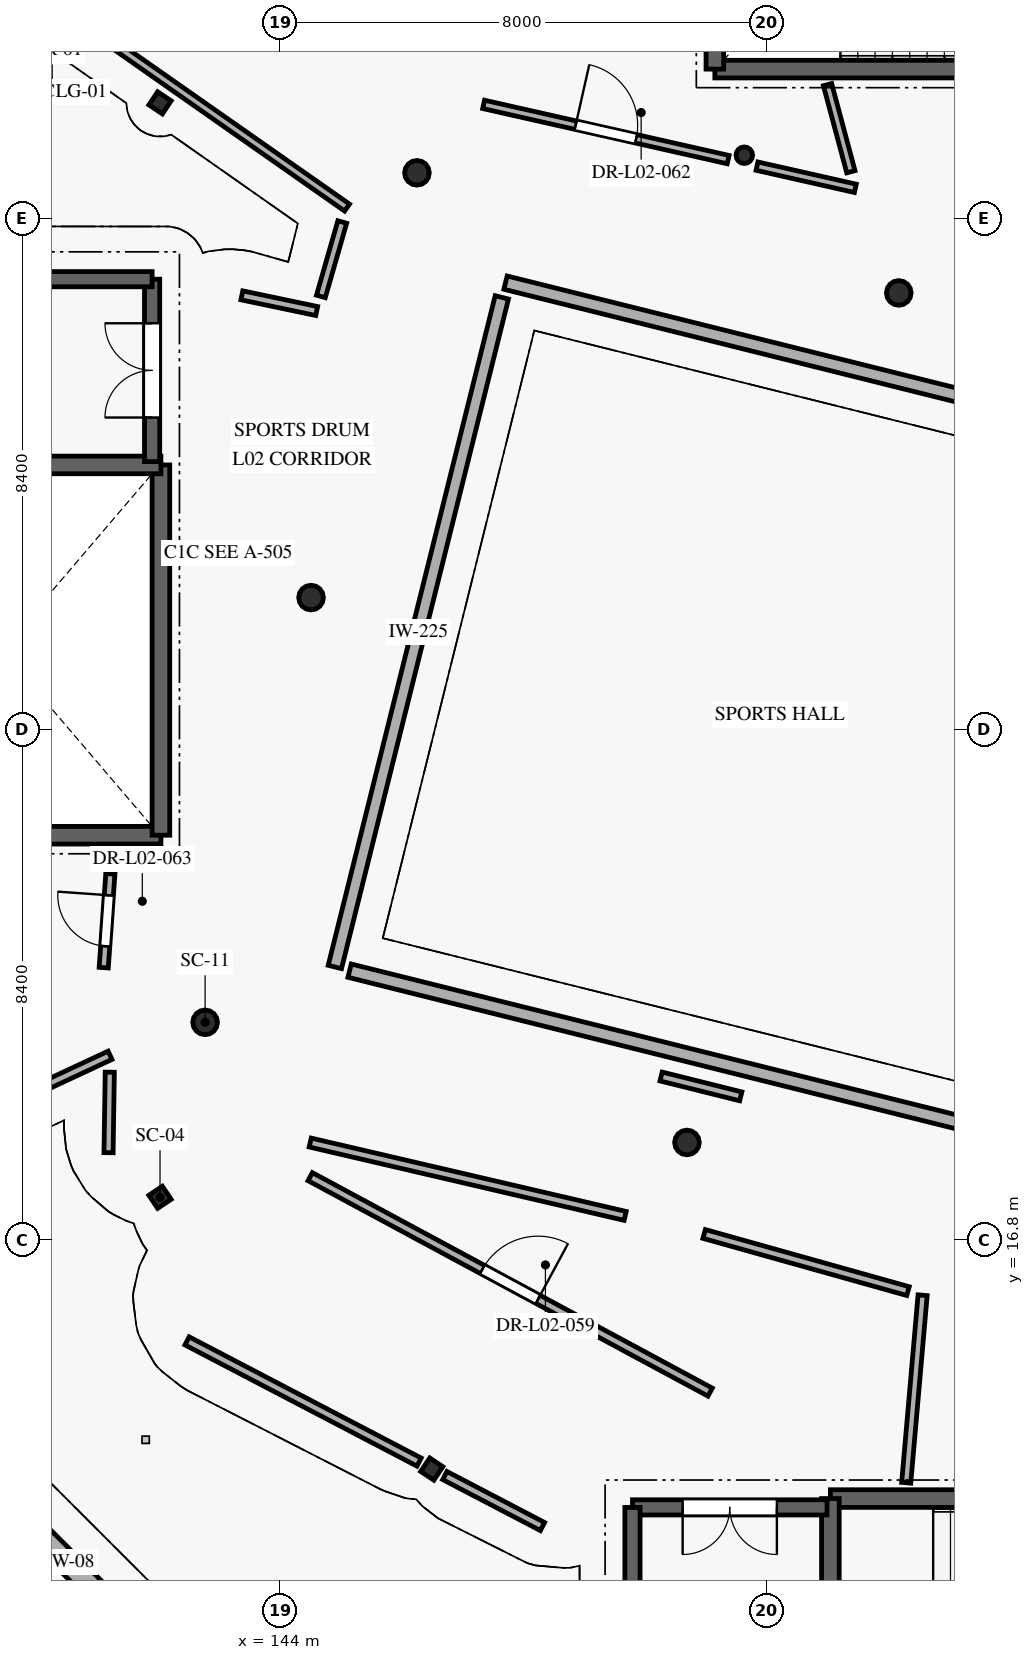
"""IFC4 building model, lengths in metres.
Left out: names, types, materials, properties, quantities, classifications, styles, units other than length and angle.
Written with IfcOpenShell. Run it as: python <this file> out.ifc"""

import sys

from ifc_helpers import new_model, si_unit, direction, frame, frame_2d, origin, origin_2d, place, context, subcontext, project, spatial, rectangle, hollow_circle, i_section, extrude, element, fill, save


model = new_model("IFC4")
c1 = context("Model", 3, precision=1e-05, world=origin(), true_north=direction((0.0, 1.0)))
c2 = subcontext(c1, "Body", "Model", "MODEL_VIEW")
j1 = project(units=[si_unit("LENGTHUNIT", "METRE"), si_unit("PLANEANGLEUNIT", "RADIAN")], contexts=[c1])
p1 = place(None, origin())
s1 = spatial("IfcSite", under=j1, at=p1, CompositionType="ELEMENT")
p2 = place(p1, origin())
s2 = spatial("IfcBuilding", under=s1, at=p2, CompositionType="ELEMENT")
p3 = place(p2, frame((0.0, 0.0, 8.4)))
s3 = spatial("IfcBuildingStorey", under=s2, at=p3, CompositionType="ELEMENT", Elevation=8.4)
for number, where, z_axis, x_axis in (
    (1, (142.772, 20.377, 0.0), (0.0, 0.0, 1.0), (0.97, -0.242, 0.0)),
    (2, (144.514, 27.364, 0.0), (0.0, 0.0, 1.0), (0.97, -0.242, 0.0)),
    (3, (146.256, 34.35, 0.0), (0.0, 0.0, 1.0), (0.97, -0.242, 0.0)),
    (4, (150.696, 18.402, 0.0), (0.0, 0.0, 1.0), (0.97, -0.242, 0.0)),
    (5, (154.18, 32.374, 0.0), (0.0, 0.0, 1.0), (0.97, -0.242, 0.0)),
):
    element("IfcColumn", number, at=place(p3, frame(where, z_axis=z_axis, x_axis=x_axis)), inside=s3, PredefinedType="COLUMN", context=c2, shape_type="SweptSolid", body=[
        extrude(hollow_circle(Radius=0.203, WallThickness=0.016, at=origin_2d()), origin(), (0.0, 0.0, 1.0), 4.2),
    ])
p4 = place(p3, frame((151.639, 34.639, 0.0), z_axis=(0.0, 0.0, 1.0), x_axis=(0.707106781187, -0.707106781187, 0.0)))
e6 = element("IfcColumn", 6, at=p4, inside=s3, PredefinedType="COLUMN", context=c2, shape_type="SweptSolid", body=[
    extrude(hollow_circle(Radius=0.136, WallThickness=0.012, at=origin_2d()), origin(), (0.0, 0.0, 1.0), 4.2),
])
for number, where, z_axis, x_axis in (
    (7, (142.03, 35.5, 0.0), (0.0, 0.0, 1.0), (-0.556, -0.831, 0.0)),
    (8, (142.03, 17.5, 0.0), (0.0, 0.0, 1.0), (0.556, -0.831, 0.0)),
    (9, (146.5, 13.03, 0.0), (0.0, 0.0, 1.0), (0.831, -0.556, 0.0)),
):
    element("IfcColumn", number, at=place(p3, frame(where, z_axis=z_axis, x_axis=x_axis)), inside=s3, PredefinedType="COLUMN", context=c2, shape_type="SweptSolid", body=[
        extrude(i_section(OverallWidth=0.259, OverallDepth=0.267, WebThickness=0.013, FlangeThickness=0.021, FilletRadius=0.013, at=origin_2d()), origin(), (0.0, 0.0, 1.0), 4.2),
    ])
p5 = place(p3, frame((143.484, 8.517, 0.0), z_axis=(0.0, 0.0, 1.0), x_axis=(-0.707106781187, 0.707106781187, 0.0)))
e10 = element("IfcWall", 10, at=p5, inside=s3, PredefinedType="SOLIDWALL", context=c2, shape_type="SweptSolid", body=[
    extrude(rectangle(XDim=8.439, YDim=0.365, at=frame_2d((4.219, 0.0))), origin(), (0.0, 0.0, 1.0), 3.94),
])
p6 = place(p5, frame((1.56, 0.0, 0.85)))
e11 = element("IfcOpeningElement", 11, at=p6, cuts=e10, PredefinedType="OPENING", context=c2, shape_type="SweptSolid", body=[
    extrude(rectangle(XDim=1.1, YDim=1.4, at=frame_2d((0.55, 0.7))), frame((0.0, 0.192, 0.0), z_axis=(0.0, -1.0, 0.0), x_axis=(1.0, 0.0, 0.0)), (0.0, 0.0, 1.0), 0.385),
])
p7 = place(p5, frame((5.704, 0.0, 0.85)))
e12 = element("IfcOpeningElement", 12, at=p7, cuts=e10, PredefinedType="OPENING", context=c2, shape_type="SweptSolid", body=[
    extrude(rectangle(XDim=1.25, YDim=1.4, at=frame_2d((0.625, 0.7))), frame((0.0, 0.192, 0.0), z_axis=(0.0, -1.0, 0.0), x_axis=(1.0, 0.0, 0.0)), (0.0, 0.0, 1.0), 0.385),
])
p8 = place(p3, frame((136.767, 13.586, 0.0), z_axis=(0.0, 0.0, 1.0), x_axis=(0.707106781187, -0.707106781187, 0.0)))
e13 = element("IfcWall", 13, at=p8, inside=s3, PredefinedType="ELEMENTEDWALL", context=c2, shape_type="SweptSolid", body=[
    extrude(rectangle(XDim=8.23, YDim=0.225, at=frame_2d((4.115, 0.0))), origin(), (0.0, 0.0, 1.0), 1.09),
])
p9 = place(p3, frame((151.155, 36.055, 0.0), z_axis=(0.0, 0.0, 1.0), x_axis=(1.0, 0.0, 0.0)))
e14 = element("IfcWall", 14, at=p9, inside=s3, PredefinedType="SHEAR", context=c2, shape_type="SweptSolid", body=[
    extrude(rectangle(XDim=6.89, YDim=0.29, at=frame_2d((3.445, 0.0))), origin(), (0.0, 0.0, 1.0), 3.95),
])
p10 = place(p3, frame((151.155, 42.345, 0.0), z_axis=(0.0, 0.0, 1.0), x_axis=(0.0, -1.0, 0.0)))
e15 = element("IfcWall", 15, at=p10, inside=s3, PredefinedType="SHEAR", context=c2, shape_type="SweptSolid", body=[
    extrude(rectangle(XDim=6.29, YDim=0.29, at=frame_2d((3.145, 0.0))), origin(), (0.0, 0.0, 1.0), 3.95),
])
p11 = place(p3, frame((159.945, 12.545, 0.0), z_axis=(0.0, 0.0, 1.0), x_axis=(-1.0, 0.0, 0.0)))
e16 = element("IfcWall", 16, at=p11, inside=s3, PredefinedType="SHEAR", context=c2, shape_type="SweptSolid", body=[
    extrude(rectangle(XDim=6.89, YDim=0.29, at=frame_2d((3.445, 0.0))), origin(), (0.0, 0.0, 1.0), 3.95),
])
p12 = place(p3, frame((153.055, 12.545, 0.0), z_axis=(0.0, 0.0, 1.0), x_axis=(0.0, -1.0, 0.0)))
e17 = element("IfcWall", 17, at=p12, inside=s3, PredefinedType="SHEAR", context=c2, shape_type="SweptSolid", body=[
    extrude(rectangle(XDim=6.29, YDim=0.29, at=frame_2d((3.145, 0.0))), origin(), (0.0, 0.0, 1.0), 3.95),
])
p13 = place(p12, frame((2.52, 0.0, 0.0)))
e18 = element("IfcOpeningElement", 18, at=p13, cuts=e17, PredefinedType="OPENING", context=c2, shape_type="SweptSolid", body=[
    extrude(rectangle(XDim=1.25, YDim=2.1, at=frame_2d((0.625, 1.05))), frame((0.0, 0.155, 0.0), z_axis=(0.0, -1.0, 0.0), x_axis=(1.0, 0.0, 0.0)), (0.0, 0.0, 1.0), 0.31),
])
p14 = place(p3, frame((153.0, 12.4, 0.0), z_axis=(0.0, 0.0, 1.0), x_axis=(-1.0, 0.0, 0.0)))
e19 = element("IfcWall", 19, at=p14, inside=s3, PredefinedType="SHEAR", context=c2, shape_type="SweptSolid", body=[
    extrude(rectangle(XDim=3.2, YDim=0.25, at=frame_2d((1.6, 0.0))), origin(), (0.0, 0.0, 1.0), 3.95),
])
p15 = place(p14, frame((0.825, 0.0, 0.0)))
e20 = element("IfcOpeningElement", 20, at=p15, cuts=e19, PredefinedType="OPENING", context=c2, shape_type="SweptSolid", body=[
    extrude(rectangle(XDim=1.55, YDim=2.15, at=frame_2d((0.775, 1.075))), frame((0.0, 0.135, 0.0), z_axis=(0.0, -1.0, 0.0), x_axis=(1.0, 0.0, 0.0)), (0.0, 0.0, 1.0), 0.27),
])
p16 = place(p3, frame((149.8, 12.4, 0.0), z_axis=(0.0, 0.0, 1.0), x_axis=(0.0, -1.0, 0.0)))
e21 = element("IfcWall", 21, at=p16, inside=s3, PredefinedType="SHEAR", context=c2, shape_type="SweptSolid", body=[
    extrude(rectangle(XDim=6.0, YDim=0.25, at=frame_2d((3.0, 0.0))), origin(), (0.0, 0.0, 1.0), 3.95),
])
p17 = place(p3, frame((135.255, 23.455, 0.0), z_axis=(0.0, 0.0, 1.0), x_axis=(1.0, 0.0, 0.0)))
e22 = element("IfcWall", 22, at=p17, inside=s3, PredefinedType="SHEAR", context=c2, shape_type="SweptSolid", body=[
    extrude(rectangle(XDim=6.79, YDim=0.29, at=frame_2d((3.395, 0.0))), origin(), (0.0, 0.0, 1.0), 3.95),
])
p18 = place(p3, frame((142.045, 23.455, 0.0), z_axis=(0.0, 0.0, 1.0), x_axis=(0.0, 1.0, 0.0)))
e23 = element("IfcWall", 23, at=p18, inside=s3, PredefinedType="SHEAR", context=c2, shape_type="SweptSolid", body=[
    extrude(rectangle(XDim=6.09, YDim=0.29, at=frame_2d((3.045, 0.0))), origin(), (0.0, 0.0, 1.0), 3.95),
])
p19 = place(p3, frame((142.045, 29.545, 0.0), z_axis=(0.0, 0.0, 1.0), x_axis=(-1.0, 0.0, 0.0)))
e24 = element("IfcWall", 24, at=p19, inside=s3, PredefinedType="SHEAR", context=c2, shape_type="SweptSolid", body=[
    extrude(rectangle(XDim=6.79, YDim=0.29, at=frame_2d((3.395, 0.0))), origin(), (0.0, 0.0, 1.0), 3.95),
])
p20 = place(p19, frame((5.25, 0.0, 0.0)))
e25 = element("IfcOpeningElement", 25, at=p20, cuts=e24, PredefinedType="OPENING", context=c2, shape_type="SweptSolid", body=[
    extrude(rectangle(XDim=1.15, YDim=2.1, at=frame_2d((0.575, 1.05))), frame((0.0, 0.155, 0.0), z_axis=(0.0, -1.0, 0.0), x_axis=(1.0, 0.0, 0.0)), (0.0, 0.0, 1.0), 0.31),
])
p21 = place(p3, frame((141.9, 29.6, 0.0), z_axis=(0.0, 0.0, 1.0), x_axis=(0.0, 1.0, 0.0)))
e26 = element("IfcWall", 26, at=p21, inside=s3, PredefinedType="SHEAR", context=c2, shape_type="SweptSolid", body=[
    extrude(rectangle(XDim=3.0, YDim=0.25, at=frame_2d((1.5, 0.0))), origin(), (0.0, 0.0, 1.0), 3.95),
])
p22 = place(p21, frame((0.725, 0.0, 0.0)))
e27 = element("IfcOpeningElement", 27, at=p22, cuts=e26, PredefinedType="OPENING", context=c2, shape_type="SweptSolid", body=[
    extrude(rectangle(XDim=1.55, YDim=2.15, at=frame_2d((0.775, 1.075))), frame((0.0, 0.135, 0.0), z_axis=(0.0, -1.0, 0.0), x_axis=(1.0, 0.0, 0.0)), (0.0, 0.0, 1.0), 0.27),
])
p23 = place(p3, frame((141.9, 32.6, 0.0), z_axis=(0.0, 0.0, 1.0), x_axis=(-1.0, 0.0, 0.0)))
e28 = element("IfcWall", 28, at=p23, inside=s3, PredefinedType="SHEAR", context=c2, shape_type="SweptSolid", body=[
    extrude(rectangle(XDim=6.5, YDim=0.25, at=frame_2d((3.25, 0.0))), origin(), (0.0, 0.0, 1.0), 3.95),
])
p24 = place(p3, frame((167.894, 27.512, 0.0), z_axis=(0.0, 0.0, 1.0), x_axis=(-0.970295584886, 0.241922462682, 0.0)))
e29 = element("IfcWall", 29, at=p24, inside=s3, PredefinedType="PARTITIONING", context=c2, shape_type="SweptSolid", body=[
    extrude(rectangle(XDim=20.8, YDim=0.225, at=frame_2d((10.4, 0.0))), origin(), (0.0, 0.0, 1.0), 3.95),
])
p25 = place(p24, frame((9.47, 0.0, 0.0)))
e30 = element("IfcOpeningElement", 30, at=p25, cuts=e29, PredefinedType="OPENING", context=c2, shape_type="SweptSolid", body=[
    extrude(rectangle(XDim=1.86, YDim=2.2, at=frame_2d((0.93, 1.1))), frame((0.0, 0.123, 0.0), z_axis=(0.0, -1.0, 0.0), x_axis=(1.0, 0.0, 0.0)), (0.0, 0.0, 1.0), 0.245),
])
p26 = place(p3, frame((147.652, 32.301, 0.0), z_axis=(0.0, 0.0, 1.0), x_axis=(-0.241928223143, -0.97029414862, 0.0)))
e31 = element("IfcWall", 31, at=p26, inside=s3, PredefinedType="PARTITIONING", context=c2, shape_type="SweptSolid", body=[
    extrude(rectangle(XDim=11.35, YDim=0.225, at=frame_2d((5.675, 0.0))), origin(), (0.0, 0.0, 1.0), 3.95),
])
p27 = place(p3, frame((145.148, 21.228, 0.0), z_axis=(0.0, 0.0, 1.0), x_axis=(0.970296746874, -0.241917802169, 0.0)))
e32 = element("IfcWall", 32, at=p27, inside=s3, PredefinedType="PARTITIONING", context=c2, shape_type="SweptSolid", body=[
    extrude(rectangle(XDim=20.55, YDim=0.225, at=frame_2d((10.275, 0.0))), origin(), (0.0, 0.0, 1.0), 3.95),
])
p28 = place(p3, frame((141.208, 19.836, 0.0), z_axis=(0.0, 0.0, 1.0), x_axis=(-0.906301055213, -0.422632697882, 0.0)))
e33 = element("IfcWall", 33, at=p28, inside=s3, PredefinedType="PARTITIONING", context=c2, shape_type="SweptSolid", body=[
    extrude(rectangle(XDim=5.288, YDim=0.15, at=frame_2d((2.644, 0.0))), origin(), (0.0, 0.0, 1.0), 3.915),
])
p29 = place(p3, frame((154.302, 12.805, 0.0), z_axis=(0.0, 0.0, 1.0), x_axis=(0.08712978082, 0.996196969125, 0.0)))
e34 = element("IfcWall", 34, at=p29, inside=s3, PredefinedType="PARTITIONING", context=c2, shape_type="SweptSolid", body=[
    extrude(rectangle(XDim=3.096, YDim=0.15, at=frame_2d((1.548, 0.0))), origin(), (0.0, 0.0, 1.0), 3.915),
])
p30 = place(p3, frame((154.331, 15.957, 0.0), z_axis=(0.0, 0.0, 1.0), x_axis=(-0.96284886492, 0.270040854913, 0.0)))
e35 = element("IfcWall", 35, at=p30, inside=s3, PredefinedType="PARTITIONING", context=c2, shape_type="SweptSolid", body=[
    extrude(rectangle(XDim=3.482, YDim=0.15, at=frame_2d((1.741, 0.0))), origin(), (0.0, 0.0, 1.0), 3.915),
])
p31 = place(p3, frame((151.581, 19.16, 0.0), z_axis=(0.0, 0.0, 1.0), x_axis=(-0.970301811202, 0.241897488986, 0.0)))
e36 = element("IfcWall", 36, at=p31, inside=s3, PredefinedType="PARTITIONING", context=c2, shape_type="SweptSolid", body=[
    extrude(rectangle(XDim=1.35, YDim=0.15, at=frame_2d((0.675, 0.0))), origin(), (0.0, 0.0, 1.0), 3.915),
])
p32 = place(p3, frame((149.679, 17.194, 0.0), z_axis=(0.0, 0.0, 1.0), x_axis=(-0.973924106984, 0.226874048396, 0.0)))
e37 = element("IfcWall", 37, at=p32, inside=s3, PredefinedType="PARTITIONING", context=c2, shape_type="SweptSolid", body=[
    extrude(rectangle(XDim=5.318, YDim=0.15, at=frame_2d((2.659, 0.0))), origin(), (0.0, 0.0, 1.0), 3.915),
])
p33 = place(p3, frame((144.5, 17.84, 0.0), z_axis=(0.0, 0.0, 1.0), x_axis=(0.880350401945, -0.474323908101, 0.0)))
e38 = element("IfcWall", 38, at=p33, inside=s3, PredefinedType="PARTITIONING", context=c2, shape_type="SweptSolid", body=[
    extrude(rectangle(XDim=7.471, YDim=0.15, at=frame_2d((3.735, 0.0))), origin(), (0.0, 0.0, 1.0), 3.915),
])
p34 = place(p33, frame((3.216, 0.0, 0.0)))
e39 = element("IfcOpeningElement", 39, at=p34, cuts=e38, PredefinedType="OPENING", context=c2, shape_type="SweptSolid", body=[
    extrude(rectangle(XDim=1.04, YDim=2.1, at=frame_2d((0.52, 1.05))), frame((0.0, 0.085, 0.0), z_axis=(0.0, -1.0, 0.0), x_axis=(1.0, 0.0, 0.0)), (0.0, 0.0, 1.0), 0.17),
])
p35 = place(p3, frame((148.32, 12.085, 0.0), z_axis=(0.0, 0.0, 1.0), x_axis=(-0.886363704314, 0.462989615084, 0.0)))
e40 = element("IfcWall", 40, at=p35, inside=s3, PredefinedType="PARTITIONING", context=c2, shape_type="SweptSolid", body=[
    extrude(rectangle(XDim=1.812, YDim=0.15, at=frame_2d((0.906, 0.0))), origin(), (0.0, 0.0, 1.0), 3.915),
])
p36 = place(p3, frame((146.291, 13.145, 0.0), z_axis=(0.0, 0.0, 1.0), x_axis=(-0.886370383777, 0.462976827457, 0.0)))
e41 = element("IfcWall", 41, at=p36, inside=s3, PredefinedType="PARTITIONING", context=c2, shape_type="SweptSolid", body=[
    extrude(rectangle(XDim=4.305, YDim=0.15, at=frame_2d((2.153, 0.0))), origin(), (0.0, 0.0, 1.0), 3.384),
])
p37 = place(p3, frame((141.184, 18.234, 0.0), z_axis=(0.0, 0.0, 1.0), x_axis=(0.015300568579, 0.999882939449, 0.0)))
e42 = element("IfcWall", 42, at=p37, inside=s3, PredefinedType="PARTITIONING", context=c2, shape_type="SweptSolid", body=[
    extrude(rectangle(XDim=1.324, YDim=0.15, at=frame_2d((0.662, 0.0))), origin(), (0.0, 0.0, 1.0), 3.915),
])
p38 = place(p3, frame((147.352, 35.475, 0.0), z_axis=(0.0, 0.0, 1.0), x_axis=(0.975434434916, -0.220289952519, 0.0)))
e43 = element("IfcWall", 43, at=p38, inside=s3, PredefinedType="PLUMBINGWALL", context=c2, shape_type="SweptSolid", body=[
    extrude(rectangle(XDim=4.123, YDim=0.14, at=frame_2d((2.062, 0.0))), origin(), (0.0, 0.0, 1.0), 3.915),
])
p39 = place(p38, frame((1.551, 0.0, 0.0)))
e44 = element("IfcOpeningElement", 44, at=p39, cuts=e43, PredefinedType="OPENING", context=c2, shape_type="SweptSolid", body=[
    extrude(rectangle(XDim=1.02, YDim=2.06, at=frame_2d((0.51, 1.03))), frame((0.0, 0.08, 0.0), z_axis=(0.0, -1.0, 0.0), x_axis=(1.0, 0.0, 0.0)), (0.0, 0.0, 1.0), 0.16),
])
p40 = place(p3, frame((151.848, 34.46, 0.0), z_axis=(0.0, 0.0, 1.0), x_axis=(0.975439981608, -0.220265390564, 0.0)))
e45 = element("IfcWall", 45, at=p40, inside=s3, PredefinedType="PLUMBINGWALL", context=c2, shape_type="SweptSolid", body=[
    extrude(rectangle(XDim=1.658, YDim=0.14, at=frame_2d((0.829, 0.0))), origin(), (0.0, 0.0, 1.0), 3.915),
])
p41 = place(p3, frame((153.392, 34.367, 0.0), z_axis=(0.0, 0.0, 1.0), x_axis=(-0.2588814164, 0.965909111792, 0.0)))
e46 = element("IfcWall", 46, at=p41, inside=s3, PredefinedType="PLUMBINGWALL", context=c2, shape_type="SweptSolid", body=[
    extrude(rectangle(XDim=1.483, YDim=0.14, at=frame_2d((0.742, 0.0))), origin(), (0.0, 0.0, 1.0), 3.915),
])
p42 = place(p3, frame((138.054, 38.716, 0.0), z_axis=(0.0, 0.0, 1.0), x_axis=(0.819154641776, -0.573572726738, 0.0)))
e47 = element("IfcWall", 47, at=p42, inside=s3, PredefinedType="PLUMBINGWALL", context=c2, shape_type="SweptSolid", body=[
    extrude(rectangle(XDim=8.609, YDim=0.14, at=frame_2d((4.305, 0.0))), origin(), (0.0, 0.0, 1.0), 3.915),
])
p43 = place(p3, frame((141.104, 21.278, 0.0), z_axis=(0.0, 0.0, 1.0), x_axis=(0.070730920157, 0.997495432037, 0.0)))
e48 = element("IfcWall", 48, at=p43, inside=s3, PredefinedType="PARTITIONING", context=c2, shape_type="SweptSolid", body=[
    extrude(rectangle(XDim=1.546, YDim=0.15, at=frame_2d((0.773, 0.0))), origin(), (0.0, 0.0, 1.0), 3.915),
])
p44 = place(p43, frame((0.353, 0.0, 0.0)))
e49 = element("IfcOpeningElement", 49, at=p44, cuts=e48, PredefinedType="OPENING", context=c2, shape_type="SweptSolid", body=[
    extrude(rectangle(XDim=0.84, YDim=2.04, at=frame_2d((0.42, 1.02))), frame((0.0, 0.085, 0.0), z_axis=(0.0, -1.0, 0.0), x_axis=(1.0, 0.0, 0.0)), (0.0, 0.0, 1.0), 0.17),
])
p45 = place(p3, frame((143.376, 32.334, 0.0), z_axis=(0.0, 0.0, 1.0), x_axis=(0.978708141887, -0.205256846424, 0.0)))
e50 = element("IfcWall", 50, at=p45, inside=s3, PredefinedType="PARTITIONING", context=c2, shape_type="SweptSolid", body=[
    extrude(rectangle(XDim=1.257, YDim=0.15, at=frame_2d((0.629, 0.0))), origin(), (0.0, 0.0, 1.0), 3.915),
])
p46 = place(p3, frame((144.676, 32.316, 0.0), z_axis=(0.0, 0.0, 1.0), x_axis=(0.275986551493, 0.961161497041, 0.0)))
e51 = element("IfcWall", 51, at=p46, inside=s3, PredefinedType="PARTITIONING", context=c2, shape_type="SweptSolid", body=[
    extrude(rectangle(XDim=1.274, YDim=0.15, at=frame_2d((0.637, 0.0))), origin(), (0.0, 0.0, 1.0), 3.915),
])
p47 = place(p15, origin())
e52 = element("IfcDoor", 52, at=p47, inside=s3, OperationType="DOUBLE_DOOR_SINGLE_SWING", PredefinedType="DOOR", context=c2, shape_type="SweptSolid", body=[
    extrude(rectangle(XDim=1.55, YDim=2.15, at=frame_2d((0.775, 1.075))), frame((0.0, 0.025, 0.0), z_axis=(0.0, -1.0, 0.0), x_axis=(1.0, 0.0, 0.0)), (0.0, 0.0, 1.0), 0.05),
])
fill(e20, e52)
p48 = place(p22, origin())
e53 = element("IfcDoor", 53, at=p48, inside=s3, OperationType="DOUBLE_DOOR_SINGLE_SWING", PredefinedType="DOOR", context=c2, shape_type="SweptSolid", body=[
    extrude(rectangle(XDim=1.55, YDim=2.15, at=frame_2d((0.775, 1.075))), frame((0.0, 0.025, 0.0), z_axis=(0.0, -1.0, 0.0), x_axis=(1.0, 0.0, 0.0)), (0.0, 0.0, 1.0), 0.05),
])
fill(e27, e53)
p49 = place(p34, origin())
e54 = element("IfcDoor", 54, at=p49, inside=s3, OperationType="SINGLE_SWING_RIGHT", PredefinedType="DOOR", context=c2, shape_type="SweptSolid", body=[
    extrude(rectangle(XDim=1.04, YDim=2.1, at=frame_2d((0.52, 1.05))), frame((0.0, 0.025, 0.0), z_axis=(0.0, -1.0, 0.0), x_axis=(1.0, 0.0, 0.0)), (0.0, 0.0, 1.0), 0.05),
])
fill(e39, e54)
p50 = place(p39, frame((1.02, 0.0, 0.0), z_axis=(0.0, 0.0, 1.0), x_axis=(-1.0, 0.0, 0.0)))
e55 = element("IfcDoor", 55, at=p50, inside=s3, OperationType="SINGLE_SWING_LEFT", PredefinedType="DOOR", context=c2, shape_type="SweptSolid", body=[
    extrude(rectangle(XDim=1.02, YDim=2.06, at=frame_2d((0.51, 1.03))), frame((0.0, 0.025, 0.0), z_axis=(0.0, -1.0, 0.0), x_axis=(1.0, 0.0, 0.0)), (0.0, 0.0, 1.0), 0.05),
])
fill(e44, e55)
p51 = place(p44, origin())
e56 = element("IfcDoor", 56, at=p51, inside=s3, OperationType="SINGLE_SWING_RIGHT", PredefinedType="DOOR", context=c2, shape_type="SweptSolid", body=[
    extrude(rectangle(XDim=0.84, YDim=2.04, at=frame_2d((0.42, 1.02))), frame((0.0, 0.025, 0.0), z_axis=(0.0, -1.0, 0.0), x_axis=(1.0, 0.0, 0.0)), (0.0, 0.0, 1.0), 0.05),
])
fill(e49, e56)
save(model, sys.argv[1])
